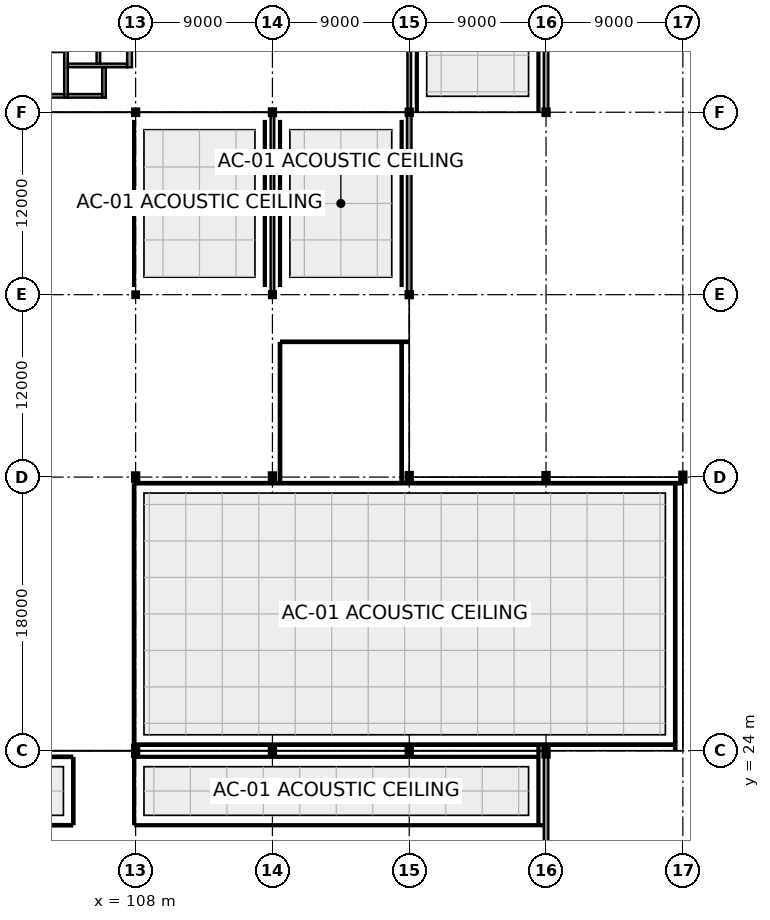
"""IFC4 building model, lengths in metres.
Left out: names, types, materials, properties, quantities, classifications, styles, units other than length and angle.
Written with IfcOpenShell. Run it as: python <this file> out.ifc"""

import sys

from ifc_helpers import new_model, si_unit, direction, frame, frame_2d, origin, origin_2d, place, context, subcontext, project, spatial, rectangle, i_section, extrude, element, fill, save


model = new_model("IFC4")
c1 = context("Model", 3, precision=1e-05, world=origin(), true_north=direction((0.0, 1.0)))
c2 = subcontext(c1, "Body", "Model", "MODEL_VIEW")
j1 = project(units=[si_unit("LENGTHUNIT", "METRE"), si_unit("PLANEANGLEUNIT", "RADIAN")], contexts=[c1])
p1 = place(None, origin())
s1 = spatial("IfcSite", under=j1, at=p1, CompositionType="ELEMENT")
p2 = place(p1, origin())
s2 = spatial("IfcBuilding", under=s1, at=p2, CompositionType="ELEMENT")
p3 = place(p2, frame((0.0, 0.0, 5.4)))
s3 = spatial("IfcBuildingStorey", under=s2, at=p3, CompositionType="ELEMENT", Elevation=5.4)
p4 = place(p3, frame((108.0, 24.0, 0.0), z_axis=(0.0, 0.0, 1.0), x_axis=(1.0, 0.0, 0.0)))
e1 = element("IfcColumn", 1, at=p4, inside=s3, PredefinedType="COLUMN", context=c2, shape_type="SweptSolid", body=[
    extrude(i_section(OverallWidth=0.3, OverallDepth=0.65, WebThickness=0.016, FlangeThickness=0.031, at=origin_2d()), origin(), (0.0, 0.0, 1.0), 4.5),
])
p5 = place(p3, frame((108.0, 42.0, 0.0), z_axis=(0.0, 0.0, 1.0), x_axis=(1.0, 0.0, 0.0)))
e2 = element("IfcColumn", 2, at=p5, inside=s3, PredefinedType="COLUMN", context=c2, shape_type="SweptSolid", body=[
    extrude(i_section(OverallWidth=0.3, OverallDepth=0.45, WebThickness=0.014, FlangeThickness=0.026, at=origin_2d()), origin(), (0.0, 0.0, 1.0), 4.5),
])
p6 = place(p3, frame((108.0, 54.0, 0.0), z_axis=(0.0, 0.0, 1.0), x_axis=(1.0, 0.0, 0.0)))
e3 = element("IfcColumn", 3, at=p6, inside=s3, PredefinedType="COLUMN", context=c2, shape_type="SweptSolid", body=[
    extrude(i_section(OverallWidth=0.26, OverallDepth=0.26, WebThickness=0.01, FlangeThickness=0.018, at=origin_2d()), origin(), (0.0, 0.0, 1.0), 4.5),
])
p7 = place(p3, frame((108.0, 66.0, 0.0), z_axis=(0.0, 0.0, 1.0), x_axis=(1.0, 0.0, 0.0)))
e4 = element("IfcColumn", 4, at=p7, inside=s3, PredefinedType="COLUMN", context=c2, shape_type="SweptSolid", body=[
    extrude(i_section(OverallWidth=0.3, OverallDepth=0.32, WebThickness=0.011, FlangeThickness=0.021, at=origin_2d()), origin(), (0.0, 0.0, 1.0), 4.5),
])
p8 = place(p3, frame((117.0, 24.0, 0.0), z_axis=(0.0, 0.0, 1.0), x_axis=(1.0, 0.0, 0.0)))
e5 = element("IfcColumn", 5, at=p8, inside=s3, PredefinedType="COLUMN", context=c2, shape_type="SweptSolid", body=[
    extrude(i_section(OverallWidth=0.3, OverallDepth=0.65, WebThickness=0.016, FlangeThickness=0.031, at=origin_2d()), origin(), (0.0, 0.0, 1.0), 4.5),
])
p9 = place(p3, frame((117.0, 42.0, 0.0), z_axis=(0.0, 0.0, 1.0), x_axis=(0.0, 1.0, 0.0)))
e6 = element("IfcColumn", 6, at=p9, inside=s3, PredefinedType="COLUMN", context=c2, shape_type="SweptSolid", body=[
    extrude(i_section(OverallWidth=0.3, OverallDepth=0.45, WebThickness=0.014, FlangeThickness=0.026, at=origin_2d()), origin(), (0.0, 0.0, 1.0), 4.5),
])
p10 = place(p3, frame((117.0, 54.0, 0.0), z_axis=(0.0, 0.0, 1.0), x_axis=(1.0, 0.0, 0.0)))
e7 = element("IfcColumn", 7, at=p10, inside=s3, PredefinedType="COLUMN", context=c2, shape_type="SweptSolid", body=[
    extrude(i_section(OverallWidth=0.28, OverallDepth=0.28, WebThickness=0.01, FlangeThickness=0.018, at=origin_2d()), origin(), (0.0, 0.0, 1.0), 4.5),
])
p11 = place(p3, frame((117.0, 66.0, 0.0), z_axis=(0.0, 0.0, 1.0), x_axis=(1.0, 0.0, 0.0)))
e8 = element("IfcColumn", 8, at=p11, inside=s3, PredefinedType="COLUMN", context=c2, shape_type="SweptSolid", body=[
    extrude(i_section(OverallWidth=0.3, OverallDepth=0.34, WebThickness=0.012, FlangeThickness=0.021, at=origin_2d()), origin(), (0.0, 0.0, 1.0), 4.5),
])
p12 = place(p3, frame((126.0, 24.0, 0.0), z_axis=(0.0, 0.0, 1.0), x_axis=(1.0, 0.0, 0.0)))
e9 = element("IfcColumn", 9, at=p12, inside=s3, PredefinedType="COLUMN", context=c2, shape_type="SweptSolid", body=[
    extrude(i_section(OverallWidth=0.3, OverallDepth=0.65, WebThickness=0.016, FlangeThickness=0.031, at=origin_2d()), origin(), (0.0, 0.0, 1.0), 4.5),
])
p13 = place(p3, frame((126.0, 42.0, 0.0), z_axis=(0.0, 0.0, 1.0), x_axis=(1.0, 0.0, 0.0)))
e10 = element("IfcColumn", 10, at=p13, inside=s3, PredefinedType="COLUMN", context=c2, shape_type="SweptSolid", body=[
    extrude(i_section(OverallWidth=0.3, OverallDepth=0.5, WebThickness=0.014, FlangeThickness=0.028, at=origin_2d()), origin(), (0.0, 0.0, 1.0), 4.5),
])
for number, where, z_axis, x_axis in (
    (11, (126.0, 54.0, 0.0), (0.0, 0.0, 1.0), (1.0, 0.0, 0.0)),
    (12, (126.0, 66.0, 0.0), (0.0, 0.0, 1.0), (0.0, 1.0, 0.0)),
):
    element("IfcColumn", number, at=place(p3, frame(where, z_axis=z_axis, x_axis=x_axis)), inside=s3, PredefinedType="COLUMN", context=c2, shape_type="SweptSolid", body=[
        extrude(i_section(OverallWidth=0.3, OverallDepth=0.3, WebThickness=0.011, FlangeThickness=0.019, at=origin_2d()), origin(), (0.0, 0.0, 1.0), 4.5),
    ])
p14 = place(p3, frame((135.0, 24.0, 0.0), z_axis=(0.0, 0.0, 1.0), x_axis=(1.0, 0.0, 0.0)))
e13 = element("IfcColumn", 13, at=p14, inside=s3, PredefinedType="COLUMN", context=c2, shape_type="SweptSolid", body=[
    extrude(i_section(OverallWidth=0.304, OverallDepth=0.716, WebThickness=0.021, FlangeThickness=0.04, at=origin_2d()), origin(), (0.0, 0.0, 1.0), 4.5),
])
p15 = place(p3, frame((135.0, 42.0, 0.0), z_axis=(0.0, 0.0, 1.0), x_axis=(1.0, 0.0, 0.0)))
e14 = element("IfcColumn", 14, at=p15, inside=s3, PredefinedType="COLUMN", context=c2, shape_type="SweptSolid", body=[
    extrude(i_section(OverallWidth=0.3, OverallDepth=0.5, WebThickness=0.014, FlangeThickness=0.028, at=origin_2d()), origin(), (0.0, 0.0, 1.0), 4.5),
])
p16 = place(p3, frame((135.0, 66.0, 0.0), z_axis=(0.0, 0.0, 1.0), x_axis=(1.0, 0.0, 0.0)))
e15 = element("IfcColumn", 15, at=p16, inside=s3, PredefinedType="COLUMN", context=c2, shape_type="SweptSolid", body=[
    extrude(i_section(OverallWidth=0.3, OverallDepth=0.32, WebThickness=0.011, FlangeThickness=0.021, at=origin_2d()), origin(), (0.0, 0.0, 1.0), 4.5),
])
p17 = place(p3, frame((144.0, 42.0, 0.0), z_axis=(0.0, 0.0, 1.0), x_axis=(1.0, 0.0, 0.0)))
e16 = element("IfcColumn", 16, at=p17, inside=s3, PredefinedType="COLUMN", context=c2, shape_type="SweptSolid", body=[
    extrude(i_section(OverallWidth=0.3, OverallDepth=0.55, WebThickness=0.015, FlangeThickness=0.029, at=origin_2d()), origin(), (0.0, 0.0, 1.0), 4.5),
])
p18 = place(p3, frame((135.0, 66.158, 0.0), z_axis=(0.0, 0.0, 1.0), x_axis=(0.0, 1.0, 0.0)))
e17 = element("IfcWall", 17, at=p18, inside=s3, PredefinedType="SOLIDWALL", context=c2, shape_type="SweptSolid", body=[
    extrude(rectangle(XDim=11.544, YDim=0.3, at=frame_2d((5.772, 0.0))), origin(), (0.0, 0.0, 1.0), 3.595),
])
p19 = place(p18, frame((2.232, 0.0, 0.8)))
e18 = element("IfcOpeningElement", 18, at=p19, cuts=e17, PredefinedType="OPENING", context=c2, shape_type="SweptSolid", body=[
    extrude(rectangle(XDim=2.0, YDim=2.0, at=frame_2d((1.0, 1.0))), frame((0.0, 0.165, 0.0), z_axis=(0.0, -1.0, 0.0), x_axis=(1.0, 0.0, 0.0)), (0.0, 0.0, 1.0), 0.33),
])
p20 = place(p18, frame((7.312, 0.0, 0.8)))
e19 = element("IfcOpeningElement", 19, at=p20, cuts=e17, PredefinedType="OPENING", context=c2, shape_type="SweptSolid", body=[
    extrude(rectangle(XDim=2.0, YDim=2.0, at=frame_2d((1.0, 1.0))), frame((0.0, 0.165, 0.0), z_axis=(0.0, -1.0, 0.0), x_axis=(1.0, 0.0, 0.0)), (0.0, 0.0, 1.0), 0.33),
])
p21 = place(p3, frame((126.0, 54.148, 0.0), z_axis=(0.0, 0.0, 1.0), x_axis=(0.0, 1.0, 0.0)))
e20 = element("IfcWall", 20, at=p21, inside=s3, PredefinedType="SOLIDWALL", context=c2, shape_type="SweptSolid", body=[
    extrude(rectangle(XDim=11.844, YDim=0.3, at=frame_2d((5.922, 0.0))), origin(), (0.0, 0.0, 1.0), 3.665),
])
p22 = place(p3, frame((135.0, 12.308, 0.0), z_axis=(0.0, 0.0, 1.0), x_axis=(0.0, 1.0, 0.0)))
e21 = element("IfcWall", 21, at=p22, inside=s3, PredefinedType="SOLIDWALL", context=c2, shape_type="SweptSolid", body=[
    extrude(rectangle(XDim=11.336, YDim=0.3, at=frame_2d((5.668, 0.0))), origin(), (0.0, 0.0, 1.0), 3.575),
])
p23 = place(p22, frame((3.732, 0.0, 0.8)))
e22 = element("IfcOpeningElement", 22, at=p23, cuts=e21, PredefinedType="OPENING", context=c2, shape_type="SweptSolid", body=[
    extrude(rectangle(XDim=2.0, YDim=2.0, at=frame_2d((1.0, 1.0))), frame((0.0, 0.165, 0.0), z_axis=(0.0, -1.0, 0.0), x_axis=(1.0, 0.0, 0.0)), (0.0, 0.0, 1.0), 0.33),
])
p24 = place(p22, frame((7.162, 0.0, 0.8)))
e23 = element("IfcOpeningElement", 23, at=p24, cuts=e21, PredefinedType="OPENING", context=c2, shape_type="SweptSolid", body=[
    extrude(rectangle(XDim=2.0, YDim=2.0, at=frame_2d((1.0, 1.0))), frame((0.0, 0.165, 0.0), z_axis=(0.0, -1.0, 0.0), x_axis=(1.0, 0.0, 0.0)), (0.0, 0.0, 1.0), 0.33),
])
p25 = place(p3, frame((103.42, 66.96, 0.0), z_axis=(0.0, 0.0, 1.0), x_axis=(0.0, 1.0, 0.0)))
e24 = element("IfcWall", 24, at=p25, inside=s3, PredefinedType="SHEAR", context=c2, shape_type="SweptSolid", body=[
    extrude(rectangle(XDim=8.28, YDim=0.24, at=frame_2d((4.14, 0.0))), origin(), (0.0, 0.0, 1.0), 4.31),
])
p26 = place(p25, frame((6.49, 0.0, 0.0)))
e25 = element("IfcOpeningElement", 25, at=p26, cuts=e24, PredefinedType="OPENING", context=c2, shape_type="SweptSolid", body=[
    extrude(rectangle(XDim=1.3, YDim=2.2, at=frame_2d((0.65, 1.1))), frame((0.0, 0.135, 0.0), z_axis=(0.0, -1.0, 0.0), x_axis=(1.0, 0.0, 0.0)), (0.0, 0.0, 1.0), 0.27),
])
p27 = place(p3, frame((99.6, 67.08, 0.0), z_axis=(0.0, 0.0, 1.0), x_axis=(1.0, 0.0, 0.0)))
e26 = element("IfcWall", 26, at=p27, inside=s3, PredefinedType="SHEAR", context=c2, shape_type="SweptSolid", body=[
    extrude(rectangle(XDim=3.7, YDim=0.24, at=frame_2d((1.85, 0.0))), origin(), (0.0, 0.0, 1.0), 4.31),
])
p28 = place(p3, frame((107.6, 68.96, 0.0), z_axis=(0.0, 0.0, 1.0), x_axis=(0.0, 1.0, 0.0)))
e27 = element("IfcWall", 27, at=p28, inside=s3, PredefinedType="SHEAR", context=c2, shape_type="SweptSolid", body=[
    extrude(rectangle(XDim=9.04, YDim=0.32, at=frame_2d((4.52, 0.0))), origin(), (0.0, 0.0, 1.0), 4.16),
])
p29 = place(p3, frame((103.54, 69.08, 0.0), z_axis=(0.0, 0.0, 1.0), x_axis=(1.0, 0.0, 0.0)))
e28 = element("IfcWall", 28, at=p29, inside=s3, PredefinedType="SHEAR", context=c2, shape_type="SweptSolid", body=[
    extrude(rectangle(XDim=3.9, YDim=0.24, at=frame_2d((1.95, 0.0))), origin(), (0.0, 0.0, 1.0), 4.31),
])
p30 = place(p3, frame((105.55, 69.2, 0.0), z_axis=(0.0, 0.0, 1.0), x_axis=(0.0, 1.0, 0.0)))
e29 = element("IfcWall", 29, at=p30, inside=s3, PredefinedType="SHEAR", context=c2, shape_type="SweptSolid", body=[
    extrude(rectangle(XDim=2.9, YDim=0.24, at=frame_2d((1.45, 0.0))), origin(), (0.0, 0.0, 1.0), 4.31),
])
p31 = place(p3, frame((105.92, 66.96, 0.0), z_axis=(0.0, 0.0, 1.0), x_axis=(0.0, 1.0, 0.0)))
e30 = element("IfcWall", 30, at=p31, inside=s3, PredefinedType="SHEAR", context=c2, shape_type="SweptSolid", body=[
    extrude(rectangle(XDim=2.0, YDim=0.24, at=frame_2d((1.0, 0.0))), origin(), (0.0, 0.0, 1.0), 4.31),
])
p32 = place(p3, frame((103.54, 67.08, 0.0), z_axis=(0.0, 0.0, 1.0), x_axis=(1.0, 0.0, 0.0)))
e31 = element("IfcWall", 31, at=p32, inside=s3, PredefinedType="SHEAR", context=c2, shape_type="SweptSolid", body=[
    extrude(rectangle(XDim=2.26, YDim=0.24, at=frame_2d((1.13, 0.0))), origin(), (0.0, 0.0, 1.0), 4.31),
])
p33 = place(p3, frame((126.0, 66.008, 0.0), z_axis=(0.0, 0.0, 1.0), x_axis=(0.0, 1.0, 0.0)))
e32 = element("IfcWall", 32, at=p33, inside=s3, PredefinedType="SHEAR", context=c2, shape_type="SweptSolid", body=[
    extrude(rectangle(XDim=11.694, YDim=0.24, at=frame_2d((5.847, 0.0))), origin(), (0.0, 0.0, 1.0), 3.645),
])
p34 = place(p3, frame((117.0, 54.138, 0.0), z_axis=(0.0, 0.0, 1.0), x_axis=(0.0, 1.0, 0.0)))
e33 = element("IfcWall", 33, at=p34, inside=s3, PredefinedType="SHEAR", context=c2, shape_type="SweptSolid", body=[
    extrude(rectangle(XDim=11.694, YDim=0.24, at=frame_2d((5.847, 0.0))), origin(), (0.0, 0.0, 1.0), 3.725),
])
for number, where, z_axis, x_axis in (
    (34, (134.5, 77.82, 0.0), (0.0, 0.0, 1.0), (0.0, -1.0, 0.0)),
    (35, (126.5, 66.075, 0.0), (0.0, 0.0, 1.0), (0.0, 1.0, 0.0)),
):
    element("IfcWall", number, at=place(p3, frame(where, z_axis=z_axis, x_axis=x_axis)), inside=s3, PredefinedType="PARTITIONING", context=c2, shape_type="SweptSolid", body=[
        extrude(rectangle(XDim=11.745, YDim=0.12, at=frame_2d((5.873, 0.0))), origin(), (0.0, 0.0, 1.0), 4.14),
    ])
p35 = place(p3, frame((107.98, 41.6, 0.0), z_axis=(0.0, 0.0, 1.0), x_axis=(1.0, 0.0, 0.0)))
e36 = element("IfcWall", 36, at=p35, inside=s3, PredefinedType="PARTITIONING", context=c2, shape_type="SweptSolid", body=[
    extrude(rectangle(XDim=36.012, YDim=0.15, at=frame_2d((18.006, 0.0))), origin(), (0.0, 0.0, 1.0), 4.14),
])
p36 = place(p3, frame((143.5, 41.53, 0.0), z_axis=(0.0, 0.0, 1.0), x_axis=(0.0, -1.0, 0.0)))
e37 = element("IfcWall", 37, at=p36, inside=s3, PredefinedType="PARTITIONING", context=c2, shape_type="SweptSolid", body=[
    extrude(rectangle(XDim=17.455, YDim=0.15, at=frame_2d((8.728, 0.0))), origin(), (0.0, 0.0, 1.0), 4.14),
])
p37 = place(p3, frame((143.43, 24.4, 0.0), z_axis=(0.0, 0.0, 1.0), x_axis=(-1.0, 0.0, 0.0)))
e38 = element("IfcWall", 38, at=p37, inside=s3, PredefinedType="PARTITIONING", context=c2, shape_type="SweptSolid", body=[
    extrude(rectangle(XDim=35.45, YDim=0.15, at=frame_2d((17.725, 0.0))), origin(), (0.0, 0.0, 1.0), 4.14),
])
p38 = place(p3, frame((107.9, 24.48, 0.0), z_axis=(0.0, 0.0, 1.0), x_axis=(0.0, 1.0, 0.0)))
e39 = element("IfcWall", 39, at=p38, inside=s3, PredefinedType="PARTITIONING", context=c2, shape_type="SweptSolid", body=[
    extrude(rectangle(XDim=17.04, YDim=0.15, at=frame_2d((8.52, 0.0))), origin(), (0.0, 0.0, 1.0), 3.415),
])
p39 = place(p38, frame((7.995, 0.0, 0.0)))
e40 = element("IfcOpeningElement", 40, at=p39, cuts=e39, PredefinedType="OPENING", context=c2, shape_type="SweptSolid", body=[
    extrude(rectangle(XDim=1.05, YDim=2.25, at=frame_2d((0.525, 1.125))), frame((0.0, 0.09, 0.0), z_axis=(0.0, -1.0, 0.0), x_axis=(1.0, 0.0, 0.0)), (0.0, 0.0, 1.0), 0.18),
])
p40 = place(p3, frame((107.9, 54.58, 0.0), z_axis=(0.0, 0.0, 1.0), x_axis=(0.0, 1.0, 0.0)))
e41 = element("IfcWall", 41, at=p40, inside=s3, PredefinedType="PARTITIONING", context=c2, shape_type="SweptSolid", body=[
    extrude(rectangle(XDim=10.84, YDim=0.12, at=frame_2d((5.42, 0.0))), origin(), (0.0, 0.0, 1.0), 3.775),
])
p41 = place(p40, frame((4.97, 0.0, 0.0)))
e42 = element("IfcOpeningElement", 42, at=p41, cuts=e41, PredefinedType="OPENING", context=c2, shape_type="SweptSolid", body=[
    extrude(rectangle(XDim=0.9, YDim=2.1, at=frame_2d((0.45, 1.05))), frame((0.0, 0.075, 0.0), z_axis=(0.0, -1.0, 0.0), x_axis=(1.0, 0.0, 0.0)), (0.0, 0.0, 1.0), 0.15),
])
p42 = place(p3, frame((116.5, 65.42, 0.0), z_axis=(0.0, 0.0, 1.0), x_axis=(0.0, -1.0, 0.0)))
e43 = element("IfcWall", 43, at=p42, inside=s3, PredefinedType="PARTITIONING", context=c2, shape_type="SweptSolid", body=[
    extrude(rectangle(XDim=10.84, YDim=0.12, at=frame_2d((5.42, 0.0))), origin(), (0.0, 0.0, 1.0), 4.14),
])
p43 = place(p3, frame((117.5, 41.67, 0.0), z_axis=(0.0, 0.0, 1.0), x_axis=(0.0, 1.0, 0.0)))
e44 = element("IfcWall", 44, at=p43, inside=s3, PredefinedType="PARTITIONING", context=c2, shape_type="SweptSolid", body=[
    extrude(rectangle(XDim=9.15, YDim=0.15, at=frame_2d((4.575, 0.0))), origin(), (0.0, 0.0, 1.0), 4.14),
])
p44 = place(p3, frame((117.58, 50.9, 0.0), z_axis=(0.0, 0.0, 1.0), x_axis=(1.0, 0.0, 0.0)))
e45 = element("IfcWall", 45, at=p44, inside=s3, PredefinedType="PARTITIONING", context=c2, shape_type="SweptSolid", body=[
    extrude(rectangle(XDim=8.345, YDim=0.15, at=frame_2d((4.172, 0.0))), origin(), (0.0, 0.0, 1.0), 4.14),
])
p45 = place(p44, frame((3.647, 0.0, 0.0)))
e46 = element("IfcOpeningElement", 46, at=p45, cuts=e45, PredefinedType="OPENING", context=c2, shape_type="SweptSolid", body=[
    extrude(rectangle(XDim=1.05, YDim=2.25, at=frame_2d((0.525, 1.125))), frame((0.0, 0.09, 0.0), z_axis=(0.0, -1.0, 0.0), x_axis=(1.0, 0.0, 0.0)), (0.0, 0.0, 1.0), 0.18),
])
p46 = place(p3, frame((125.5, 50.83, 0.0), z_axis=(0.0, 0.0, 1.0), x_axis=(0.0, -1.0, 0.0)))
e47 = element("IfcWall", 47, at=p46, inside=s3, PredefinedType="PARTITIONING", context=c2, shape_type="SweptSolid", body=[
    extrude(rectangle(XDim=9.16, YDim=0.15, at=frame_2d((4.58, 0.0))), origin(), (0.0, 0.0, 1.0), 4.14),
])
for number, where, z_axis, x_axis in (
    (48, (117.5, 54.58, 0.0), (0.0, 0.0, 1.0), (0.0, 1.0, 0.0)),
    (49, (125.5, 65.42, 0.0), (0.0, 0.0, 1.0), (0.0, -1.0, 0.0)),
):
    element("IfcWall", number, at=place(p3, frame(where, z_axis=z_axis, x_axis=x_axis)), inside=s3, PredefinedType="PARTITIONING", context=c2, shape_type="SweptSolid", body=[
        extrude(rectangle(XDim=10.84, YDim=0.12, at=frame_2d((5.42, 0.0))), origin(), (0.0, 0.0, 1.0), 4.14),
    ])
p47 = place(p3, frame((103.82, 19.1, 0.0), z_axis=(0.0, 0.0, 1.0), x_axis=(-1.0, 0.0, 0.0)))
e50 = element("IfcWall", 50, at=p47, inside=s3, PredefinedType="PARTITIONING", context=c2, shape_type="SweptSolid", body=[
    extrude(rectangle(XDim=27.64, YDim=0.15, at=frame_2d((13.82, 0.0))), origin(), (0.0, 0.0, 1.0), 4.14),
])
p48 = place(p47, frame((13.295, 0.0, 0.0)))
e51 = element("IfcOpeningElement", 51, at=p48, cuts=e50, PredefinedType="OPENING", context=c2, shape_type="SweptSolid", body=[
    extrude(rectangle(XDim=1.05, YDim=2.25, at=frame_2d((0.525, 1.125))), frame((0.0, 0.09, 0.0), z_axis=(0.0, -1.0, 0.0), x_axis=(1.0, 0.0, 0.0)), (0.0, 0.0, 1.0), 0.18),
])
p49 = place(p3, frame((76.18, 23.6, 0.0), z_axis=(0.0, 0.0, 1.0), x_axis=(1.0, 0.0, 0.0)))
e52 = element("IfcWall", 52, at=p49, inside=s3, PredefinedType="PARTITIONING", context=c2, shape_type="SweptSolid", body=[
    extrude(rectangle(XDim=27.64, YDim=0.15, at=frame_2d((13.82, 0.0))), origin(), (0.0, 0.0, 1.0), 4.14),
])
p50 = place(p3, frame((103.9, 23.52, 0.0), z_axis=(0.0, 0.0, 1.0), x_axis=(0.0, -1.0, 0.0)))
e53 = element("IfcWall", 53, at=p50, inside=s3, PredefinedType="PARTITIONING", context=c2, shape_type="SweptSolid", body=[
    extrude(rectangle(XDim=4.34, YDim=0.15, at=frame_2d((2.17, 0.0))), origin(), (0.0, 0.0, 1.0), 4.14),
])
p51 = place(p3, frame((134.5, 24.33, 0.0), z_axis=(0.0, 0.0, 1.0), x_axis=(0.0, -1.0, 0.0)))
e54 = element("IfcWall", 54, at=p51, inside=s3, PredefinedType="PARTITIONING", context=c2, shape_type="SweptSolid", body=[
    extrude(rectangle(XDim=5.15, YDim=0.12, at=frame_2d((2.575, 0.0))), origin(), (0.0, 0.0, 1.0), 4.14),
])
p52 = place(p3, frame((134.855, 19.1, 0.0), z_axis=(0.0, 0.0, 1.0), x_axis=(-1.0, 0.0, 0.0)))
e55 = element("IfcWall", 55, at=p52, inside=s3, PredefinedType="PARTITIONING", context=c2, shape_type="SweptSolid", body=[
    extrude(rectangle(XDim=26.875, YDim=0.12, at=frame_2d((13.438, 0.0))), origin(), (0.0, 0.0, 1.0), 4.14),
])
p53 = place(p52, frame((12.988, 0.0, 0.0)))
e56 = element("IfcOpeningElement", 56, at=p53, cuts=e55, PredefinedType="OPENING", context=c2, shape_type="SweptSolid", body=[
    extrude(rectangle(XDim=0.9, YDim=2.1, at=frame_2d((0.45, 1.05))), frame((0.0, 0.075, 0.0), z_axis=(0.0, -1.0, 0.0), x_axis=(1.0, 0.0, 0.0)), (0.0, 0.0, 1.0), 0.15),
])
p54 = place(p3, frame((107.9, 19.18, 0.0), z_axis=(0.0, 0.0, 1.0), x_axis=(0.0, 1.0, 0.0)))
e57 = element("IfcWall", 57, at=p54, inside=s3, PredefinedType="PARTITIONING", context=c2, shape_type="SweptSolid", body=[
    extrude(rectangle(XDim=4.34, YDim=0.12, at=frame_2d((2.17, 0.0))), origin(), (0.0, 0.0, 1.0), 3.735),
])
p55 = place(p3, frame((107.98, 23.6, 0.0), z_axis=(0.0, 0.0, 1.0), x_axis=(1.0, 0.0, 0.0)))
e58 = element("IfcWall", 58, at=p55, inside=s3, PredefinedType="PARTITIONING", context=c2, shape_type="SweptSolid", body=[
    extrude(rectangle(XDim=26.465, YDim=0.12, at=frame_2d((13.232, 0.0))), origin(), (0.0, 0.0, 1.0), 4.14),
])
p56 = place(p19, origin())
e59 = element("IfcWindow", 59, at=p56, inside=s3, PartitioningType="SINGLE_PANEL", PredefinedType="WINDOW", context=c2, shape_type="SweptSolid", body=[
    extrude(rectangle(XDim=2.0, YDim=2.0, at=frame_2d((1.0, 1.0))), frame((0.0, 0.03, 0.0), z_axis=(0.0, -1.0, 0.0), x_axis=(1.0, 0.0, 0.0)), (0.0, 0.0, 1.0), 0.06),
])
fill(e18, e59)
p57 = place(p24, origin())
e60 = element("IfcWindow", 60, at=p57, inside=s3, PartitioningType="SINGLE_PANEL", PredefinedType="WINDOW", context=c2, shape_type="SweptSolid", body=[
    extrude(rectangle(XDim=2.0, YDim=2.0, at=frame_2d((1.0, 1.0))), frame((0.0, 0.03, 0.0), z_axis=(0.0, -1.0, 0.0), x_axis=(1.0, 0.0, 0.0)), (0.0, 0.0, 1.0), 0.06),
])
fill(e23, e60)
p58 = place(p39, origin())
e61 = element("IfcDoor", 61, at=p58, inside=s3, OperationType="SINGLE_SWING_LEFT", PredefinedType="DOOR", context=c2, shape_type="SweptSolid", body=[
    extrude(rectangle(XDim=1.05, YDim=2.25, at=frame_2d((0.525, 1.125))), frame((0.0, 0.025, 0.0), z_axis=(0.0, -1.0, 0.0), x_axis=(1.0, 0.0, 0.0)), (0.0, 0.0, 1.0), 0.05),
])
fill(e40, e61)
p59 = place(p41, frame((0.9, 0.0, 0.0), z_axis=(0.0, 0.0, 1.0), x_axis=(-1.0, 0.0, 0.0)))
e62 = element("IfcDoor", 62, at=p59, inside=s3, OperationType="SINGLE_SWING_RIGHT", PredefinedType="DOOR", context=c2, shape_type="SweptSolid", body=[
    extrude(rectangle(XDim=0.9, YDim=2.1, at=frame_2d((0.45, 1.05))), frame((0.0, 0.025, 0.0), z_axis=(0.0, -1.0, 0.0), x_axis=(1.0, 0.0, 0.0)), (0.0, 0.0, 1.0), 0.05),
])
fill(e42, e62)
p60 = place(p45, origin())
e63 = element("IfcDoor", 63, at=p60, inside=s3, OperationType="SINGLE_SWING_LEFT", PredefinedType="DOOR", context=c2, shape_type="SweptSolid", body=[
    extrude(rectangle(XDim=1.05, YDim=2.25, at=frame_2d((0.525, 1.125))), frame((0.0, 0.025, 0.0), z_axis=(0.0, -1.0, 0.0), x_axis=(1.0, 0.0, 0.0)), (0.0, 0.0, 1.0), 0.05),
])
fill(e46, e63)
p61 = place(p53, origin())
e64 = element("IfcDoor", 64, at=p61, inside=s3, OperationType="SINGLE_SWING_LEFT", PredefinedType="DOOR", context=c2, shape_type="SweptSolid", body=[
    extrude(rectangle(XDim=0.9, YDim=2.1, at=frame_2d((0.45, 1.05))), frame((0.0, 0.025, 0.0), z_axis=(0.0, -1.0, 0.0), x_axis=(1.0, 0.0, 0.0)), (0.0, 0.0, 1.0), 0.05),
])
fill(e56, e64)
save(model, sys.argv[1])
